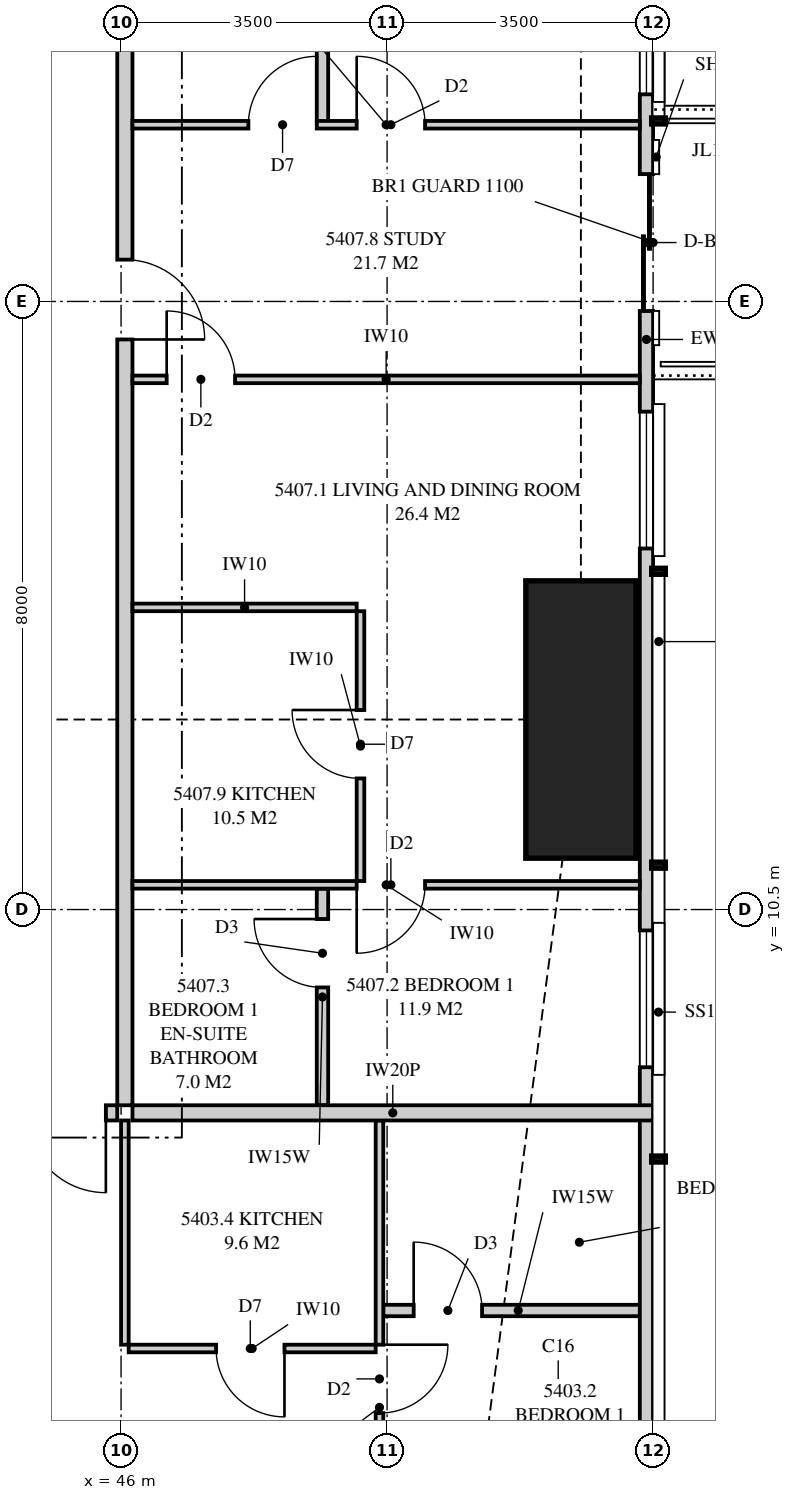
"""IFC4 building model, lengths in metres.
Left out: names, types, materials, properties, quantities, classifications, styles, units other than length and angle.
Written with IfcOpenShell. Run it as: python <this file> out.ifc"""

import sys

from ifc_helpers import new_model, si_unit, direction, frame, frame_2d, origin, origin_2d, place, context, subcontext, project, spatial, polyline, rectangle, outline, extrude, element, fill, save


model = new_model("IFC4")
c1 = context("Model", 3, precision=1e-05, world=origin(), true_north=direction((0.0, 1.0)))
c2 = subcontext(c1, "Body", "Model", "MODEL_VIEW")
j1 = project(units=[si_unit("LENGTHUNIT", "METRE"), si_unit("PLANEANGLEUNIT", "RADIAN")], contexts=[c1])
p1 = place(None, origin())
s1 = spatial("IfcSite", under=j1, at=p1, CompositionType="ELEMENT")
p2 = place(p1, origin())
s2 = spatial("IfcBuilding", under=s1, at=p2, CompositionType="ELEMENT")
p3 = place(p2, frame((0.0, 0.0, 197.9)))
s3 = spatial("IfcBuildingStorey", under=s2, at=p3, CompositionType="ELEMENT", Elevation=197.9)
p4 = place(p3, frame((52.05, 13.0, 0.0), z_axis=(0.0, 0.0, 1.0), x_axis=(1.0, 0.0, 0.0)))
e1 = element("IfcColumn", 1, at=p4, inside=s3, PredefinedType="COLUMN", context=c2, shape_type="SweptSolid", body=[
    extrude(rectangle(XDim=1.45, YDim=3.65, at=origin_2d()), origin(), (0.0, 0.0, 1.0), 3.35),
])
p5 = place(p3, frame((52.913, 3.051, 0.0), z_axis=(0.0, 0.0, 1.0), x_axis=(0.0, 1.0, 0.0)))
e2 = element("IfcWall", 2, at=p5, inside=s3, PredefinedType="SOLIDWALL", context=c2, shape_type="SweptSolid", body=[
    extrude(outline(polyline([(0.0, 0.0), (29.897, 0.0), (29.897, 3.11), (22.167, 3.11), (22.167, 2.15), (22.074, 2.15), (22.074, 3.11), (21.949, 3.11), (21.949, 2.15), (9.949, 2.15), (9.949, 3.11), (9.847, 3.11), (9.847, 2.15), (9.706, 2.15), (9.706, 3.11), (0.0, 3.11), (0.0, 0.0)])), frame((0.0, 0.087, 0.0), z_axis=(0.0, -1.0, 0.0), x_axis=(1.0, 0.0, 0.0)), (0.0, 0.0, 1.0), 0.175),
])
p6 = place(p5, frame((5.374, 0.0, 0.4)))
e3 = element("IfcOpeningElement", 3, at=p6, cuts=e2, PredefinedType="OPENING", context=c2, shape_type="SweptSolid", body=[
    extrude(rectangle(XDim=1.8, YDim=1.7, at=frame_2d((0.9, 0.85))), frame((0.0, 0.097, 0.0), z_axis=(0.0, -1.0, 0.0), x_axis=(1.0, 0.0, 0.0)), (0.0, 0.0, 1.0), 0.195),
])
p7 = place(p5, frame((12.199, 0.0, 0.4)))
e4 = element("IfcOpeningElement", 4, at=p7, cuts=e2, PredefinedType="OPENING", context=c2, shape_type="SweptSolid", body=[
    extrude(rectangle(XDim=1.8, YDim=1.7, at=frame_2d((0.9, 0.85))), frame((0.0, 0.097, 0.0), z_axis=(0.0, -1.0, 0.0), x_axis=(1.0, 0.0, 0.0)), (0.0, 0.0, 1.0), 0.195),
])
p8 = place(p5, frame((15.324, 0.0, 0.0)))
e5 = element("IfcOpeningElement", 5, at=p8, cuts=e2, PredefinedType="OPENING", context=c2, shape_type="SweptSolid", body=[
    extrude(rectangle(XDim=1.8, YDim=2.1, at=frame_2d((0.9, 1.05))), frame((0.0, 0.097, 0.0), z_axis=(0.0, -1.0, 0.0), x_axis=(1.0, 0.0, 0.0)), (0.0, 0.0, 1.0), 0.195),
])
p9 = place(p5, frame((18.174, 0.0, 0.4)))
e6 = element("IfcOpeningElement", 6, at=p9, cuts=e2, PredefinedType="OPENING", context=c2, shape_type="SweptSolid", body=[
    extrude(rectangle(XDim=1.8, YDim=1.7, at=frame_2d((0.9, 0.85))), frame((0.0, 0.097, 0.0), z_axis=(0.0, -1.0, 0.0), x_axis=(1.0, 0.0, 0.0)), (0.0, 0.0, 1.0), 0.195),
])
p10 = place(p5, frame((23.886, 0.0, 0.4)))
e7 = element("IfcOpeningElement", 7, at=p10, cuts=e2, PredefinedType="OPENING", context=c2, shape_type="SweptSolid", body=[
    extrude(rectangle(XDim=1.8, YDim=1.7, at=frame_2d((0.9, 0.85))), frame((0.0, 0.097, 0.0), z_axis=(0.0, -1.0, 0.0), x_axis=(1.0, 0.0, 0.0)), (0.0, 0.0, 1.0), 0.195),
])
p11 = place(p5, frame((26.871, 0.0, 0.4)))
e8 = element("IfcOpeningElement", 8, at=p11, cuts=e2, PredefinedType="OPENING", context=c2, shape_type="SweptSolid", body=[
    extrude(rectangle(XDim=1.8, YDim=1.7, at=frame_2d((0.9, 0.85))), frame((0.0, 0.097, 0.0), z_axis=(0.0, -1.0, 0.0), x_axis=(1.0, 0.0, 0.0)), (0.0, 0.0, 1.0), 0.195),
])
p12 = place(p3, frame((41.4, 7.825, 0.0), z_axis=(0.0, 0.0, 1.0), x_axis=(1.0, 0.0, 0.0)))
e9 = element("IfcWall", 9, at=p12, inside=s3, PredefinedType="PARTITIONING", context=c2, shape_type="SweptSolid", body=[
    extrude(outline(polyline([(0.0, 0.0), (4.55, 0.0), (4.55, 3.11), (1.688, 3.11), (1.688, 2.541), (1.013, 2.541), (1.013, 3.11), (0.0, 3.11), (0.0, 0.0)])), frame((0.0, 0.1, 0.0), z_axis=(0.0, -1.0, 0.0), x_axis=(1.0, 0.0, 0.0)), (0.0, 0.0, 1.0), 0.2),
])
p13 = place(p12, frame((3.35, 0.0, 0.0)))
e10 = element("IfcOpeningElement", 10, at=p13, cuts=e9, PredefinedType="OPENING", context=c2, shape_type="SweptSolid", body=[
    extrude(rectangle(XDim=1.05, YDim=2.2, at=frame_2d((0.525, 1.1))), frame((0.0, 0.11, 0.0), z_axis=(0.0, -1.0, 0.0), x_axis=(1.0, 0.0, 0.0)), (0.0, 0.0, 1.0), 0.22),
])
p14 = place(p3, frame((49.4, 0.175, 0.0), z_axis=(0.0, 0.0, 1.0), x_axis=(0.0, 1.0, 0.0)))
e11 = element("IfcWall", 11, at=p14, inside=s3, PredefinedType="PARTITIONING", context=c2, shape_type="SweptSolid", body=[
    extrude(outline(polyline([(0.0, 0.0), (7.55, 0.0), (7.55, 3.11), (2.825, 3.11), (2.825, 2.15), (1.079, 2.15), (1.079, 3.11), (0.0, 3.11), (0.0, 0.0)])), frame((0.0, 0.05, 0.0), z_axis=(0.0, -1.0, 0.0), x_axis=(1.0, 0.0, 0.0)), (0.0, 0.0, 1.0), 0.1),
])
p15 = place(p14, frame((3.7, 0.0, 0.0)))
e12 = element("IfcOpeningElement", 12, at=p15, cuts=e11, PredefinedType="OPENING", context=c2, shape_type="SweptSolid", body=[
    extrude(rectangle(XDim=0.9, YDim=2.1, at=frame_2d((0.45, 1.05))), frame((0.0, 0.06, 0.0), z_axis=(0.0, -1.0, 0.0), x_axis=(1.0, 0.0, 0.0)), (0.0, 0.0, 1.0), 0.12),
])
p16 = place(p3, frame((49.45, 5.225, 0.0), z_axis=(0.0, 0.0, 1.0), x_axis=(1.0, 0.0, 0.0)))
e13 = element("IfcWall", 13, at=p16, inside=s3, PredefinedType="PLUMBINGWALL", context=c2, shape_type="SweptSolid", body=[
    extrude(outline(polyline([(0.0, 0.0), (3.55, 0.0), (3.55, 3.11), (2.472, 3.11), (2.472, 2.15), (0.687, 2.15), (0.687, 3.11), (0.0, 3.11), (0.0, 0.0)])), frame((0.0, 0.075, 0.0), z_axis=(0.0, -1.0, 0.0), x_axis=(1.0, 0.0, 0.0)), (0.0, 0.0, 1.0), 0.15),
])
p17 = place(p16, frame((0.4, 0.0, 0.0)))
e14 = element("IfcOpeningElement", 14, at=p17, cuts=e13, PredefinedType="OPENING", context=c2, shape_type="SweptSolid", body=[
    extrude(rectangle(XDim=0.9, YDim=2.1, at=frame_2d((0.45, 1.05))), frame((0.0, 0.085, 0.0), z_axis=(0.0, -1.0, 0.0), x_axis=(1.0, 0.0, 0.0)), (0.0, 0.0, 1.0), 0.17),
])
p18 = place(p3, frame((46.1, 4.725, 0.0), z_axis=(0.0, 0.0, 1.0), x_axis=(1.0, 0.0, 0.0)))
e15 = element("IfcWall", 15, at=p18, inside=s3, PredefinedType="PARTITIONING", context=c2, shape_type="SweptSolid", body=[
    extrude(rectangle(XDim=3.25, YDim=0.1, at=frame_2d((1.625, 0.0))), origin(), (0.0, 0.0, 1.0), 3.11),
])
p19 = place(p18, frame((1.15, 0.0, 0.0)))
e16 = element("IfcOpeningElement", 16, at=p19, cuts=e15, PredefinedType="OPENING", context=c2, shape_type="SweptSolid", body=[
    extrude(rectangle(XDim=0.9, YDim=2.1, at=frame_2d((0.45, 1.05))), frame((0.0, 0.06, 0.0), z_axis=(0.0, -1.0, 0.0), x_axis=(1.0, 0.0, 0.0)), (0.0, 0.0, 1.0), 0.12),
])
p20 = place(p3, frame((46.05, 4.775, 0.0), z_axis=(0.0, 0.0, 1.0), x_axis=(0.0, 1.0, 0.0)))
e17 = element("IfcWall", 17, at=p20, inside=s3, PredefinedType="PARTITIONING", context=c2, shape_type="SweptSolid", body=[
    extrude(rectangle(XDim=2.95, YDim=0.1, at=frame_2d((1.475, 0.0))), origin(), (0.0, 0.0, 1.0), 3.11),
])
p21 = place(p3, frame((46.15, 7.825, 0.0), z_axis=(0.0, 0.0, 1.0), x_axis=(1.0, 0.0, 0.0)))
e18 = element("IfcWall", 18, at=p21, inside=s3, PredefinedType="PARTITIONING", context=c2, shape_type="SweptSolid", body=[
    extrude(outline(polyline([(0.0, 0.0), (6.85, 0.0), (6.85, 3.11), (6.138, 3.11), (6.138, 2.15), (4.303, 2.15), (4.303, 3.11), (0.0, 3.11), (0.0, 0.0)])), frame((0.0, 0.1, 0.0), z_axis=(0.0, -1.0, 0.0), x_axis=(1.0, 0.0, 0.0)), (0.0, 0.0, 1.0), 0.2),
])
p22 = place(p3, frame((46.05, 7.925, 0.0), z_axis=(0.0, 0.0, 1.0), x_axis=(0.0, 1.0, 0.0)))
e19 = element("IfcWall", 19, at=p22, inside=s3, PredefinedType="PARTITIONING", context=c2, shape_type="SweptSolid", body=[
    extrude(outline(polyline([(0.0, 0.0), (21.15, 0.0), (21.15, 3.11), (17.412, 3.11), (17.412, 2.541), (16.738, 2.541), (16.738, 3.11), (5.412, 3.11), (5.412, 2.541), (4.738, 2.541), (4.738, 3.11), (0.0, 3.11), (0.0, 0.0)])), frame((0.0, 0.1, 0.0), z_axis=(0.0, -1.0, 0.0), x_axis=(1.0, 0.0, 0.0)), (0.0, 0.0, 1.0), 0.2),
])
p23 = place(p22, frame((10.075, 0.0, 0.0)))
e20 = element("IfcOpeningElement", 20, at=p23, cuts=e19, PredefinedType="OPENING", context=c2, shape_type="SweptSolid", body=[
    extrude(rectangle(XDim=1.05, YDim=2.2, at=frame_2d((0.525, 1.1))), frame((0.0, 0.11, 0.0), z_axis=(0.0, -1.0, 0.0), x_axis=(1.0, 0.0, 0.0)), (0.0, 0.0, 1.0), 0.22),
])
p24 = place(p3, frame((52.825, 10.825, 0.0), z_axis=(0.0, 0.0, 1.0), x_axis=(-1.0, 0.0, 0.0)))
e21 = element("IfcWall", 21, at=p24, inside=s3, PredefinedType="PARTITIONING", context=c2, shape_type="SweptSolid", body=[
    extrude(outline(polyline([(0.0, 0.0), (6.675, 0.0), (6.675, 3.11), (1.928, 3.11), (1.928, 2.15), (0.193, 2.15), (0.193, 3.11), (0.0, 3.11), (0.0, 0.0)])), frame((0.0, 0.05, 0.0), z_axis=(0.0, -1.0, 0.0), x_axis=(1.0, 0.0, 0.0)), (0.0, 0.0, 1.0), 0.1),
])
p25 = place(p24, frame((2.825, 0.0, 0.0)))
e22 = element("IfcOpeningElement", 22, at=p25, cuts=e21, PredefinedType="OPENING", context=c2, shape_type="SweptSolid", body=[
    extrude(rectangle(XDim=0.9, YDim=2.1, at=frame_2d((0.45, 1.05))), frame((0.0, 0.06, 0.0), z_axis=(0.0, -1.0, 0.0), x_axis=(1.0, 0.0, 0.0)), (0.0, 0.0, 1.0), 0.12),
])
p26 = place(p3, frame((52.825, 20.825, 0.0), z_axis=(0.0, 0.0, 1.0), x_axis=(-1.0, 0.0, 0.0)))
e23 = element("IfcWall", 23, at=p26, inside=s3, PredefinedType="PARTITIONING", context=c2, shape_type="SweptSolid", body=[
    extrude(outline(polyline([(0.0, 0.0), (6.675, 0.0), (6.675, 3.11), (1.635, 3.11), (1.635, 2.15), (0.0, 2.15), (0.0, 3.11), (0.0, 0.0)])), frame((0.0, 0.05, 0.0), z_axis=(0.0, -1.0, 0.0), x_axis=(1.0, 0.0, 0.0)), (0.0, 0.0, 1.0), 0.1),
])
p27 = place(p26, frame((2.825, 0.0, 0.0)))
e24 = element("IfcOpeningElement", 24, at=p27, cuts=e23, PredefinedType="OPENING", context=c2, shape_type="SweptSolid", body=[
    extrude(rectangle(XDim=0.9, YDim=2.1, at=frame_2d((0.45, 1.05))), frame((0.0, 0.06, 0.0), z_axis=(0.0, -1.0, 0.0), x_axis=(1.0, 0.0, 0.0)), (0.0, 0.0, 1.0), 0.12),
])
p28 = place(p26, frame((4.25, 0.0, 0.0)))
e25 = element("IfcOpeningElement", 25, at=p28, cuts=e23, PredefinedType="OPENING", context=c2, shape_type="SweptSolid", body=[
    extrude(rectangle(XDim=0.9, YDim=2.1, at=frame_2d((0.45, 1.05))), frame((0.0, 0.06, 0.0), z_axis=(0.0, -1.0, 0.0), x_axis=(1.0, 0.0, 0.0)), (0.0, 0.0, 1.0), 0.12),
])
p29 = place(p3, frame((48.65, 7.925, 0.0), z_axis=(0.0, 0.0, 1.0), x_axis=(0.0, 1.0, 0.0)))
e26 = element("IfcWall", 26, at=p29, inside=s3, PredefinedType="PLUMBINGWALL", context=c2, shape_type="SweptSolid", body=[
    extrude(rectangle(XDim=2.85, YDim=0.15, at=frame_2d((1.425, 0.0))), origin(), (0.0, 0.0, 1.0), 3.11),
])
p30 = place(p29, frame((1.55, 0.0, 0.0)))
e27 = element("IfcOpeningElement", 27, at=p30, cuts=e26, PredefinedType="OPENING", context=c2, shape_type="SweptSolid", body=[
    extrude(rectangle(XDim=0.9, YDim=2.1, at=frame_2d((0.45, 1.05))), frame((0.0, 0.085, 0.0), z_axis=(0.0, -1.0, 0.0), x_axis=(1.0, 0.0, 0.0)), (0.0, 0.0, 1.0), 0.17),
])
p31 = place(p3, frame((48.65, 20.875, 0.0), z_axis=(0.0, 0.0, 1.0), x_axis=(0.0, 1.0, 0.0)))
e28 = element("IfcWall", 28, at=p31, inside=s3, PredefinedType="PLUMBINGWALL", context=c2, shape_type="SweptSolid", body=[
    extrude(outline(polyline([(0.0, 0.0), (4.9, 0.0), (4.9, 3.11), (4.438, 3.11), (4.438, 2.541), (3.812, 2.541), (3.812, 3.11), (0.0, 3.11), (0.0, 0.0)])), frame((0.0, 0.075, 0.0), z_axis=(0.0, -1.0, 0.0), x_axis=(1.0, 0.0, 0.0)), (0.0, 0.0, 1.0), 0.15),
])
p32 = place(p3, frame((52.825, 17.475, 0.0), z_axis=(0.0, 0.0, 1.0), x_axis=(-1.0, 0.0, 0.0)))
e29 = element("IfcWall", 29, at=p32, inside=s3, PredefinedType="PARTITIONING", context=c2, shape_type="SweptSolid", body=[
    extrude(outline(polyline([(0.0, 0.0), (6.675, 0.0), (6.675, 3.11), (1.635, 3.11), (1.635, 2.15), (0.0, 2.15), (0.0, 3.11), (0.0, 0.0)])), frame((0.0, 0.05, 0.0), z_axis=(0.0, -1.0, 0.0), x_axis=(1.0, 0.0, 0.0)), (0.0, 0.0, 1.0), 0.1),
])
p33 = place(p32, frame((5.325, 0.0, 0.0)))
e30 = element("IfcOpeningElement", 30, at=p33, cuts=e29, PredefinedType="OPENING", context=c2, shape_type="SweptSolid", body=[
    extrude(rectangle(XDim=0.9, YDim=2.1, at=frame_2d((0.45, 1.05))), frame((0.0, 0.06, 0.0), z_axis=(0.0, -1.0, 0.0), x_axis=(1.0, 0.0, 0.0)), (0.0, 0.0, 1.0), 0.12),
])
p34 = place(p3, frame((49.15, 10.875, 0.0), z_axis=(0.0, 0.0, 1.0), x_axis=(0.0, 1.0, 0.0)))
e31 = element("IfcWall", 31, at=p34, inside=s3, PredefinedType="PARTITIONING", context=c2, shape_type="SweptSolid", body=[
    extrude(outline(polyline([(0.0, 0.0), (3.55, 0.0), (3.55, 3.11), (2.412, 3.11), (2.412, 2.541), (1.838, 2.541), (1.838, 3.11), (0.0, 3.11), (0.0, 0.0)])), frame((0.0, 0.05, 0.0), z_axis=(0.0, -1.0, 0.0), x_axis=(1.0, 0.0, 0.0)), (0.0, 0.0, 1.0), 0.1),
])
p35 = place(p34, frame((1.35, 0.0, 0.0)))
e32 = element("IfcOpeningElement", 32, at=p35, cuts=e31, PredefinedType="OPENING", context=c2, shape_type="SweptSolid", body=[
    extrude(rectangle(XDim=0.9, YDim=2.1, at=frame_2d((0.45, 1.05))), frame((0.0, 0.06, 0.0), z_axis=(0.0, -1.0, 0.0), x_axis=(1.0, 0.0, 0.0)), (0.0, 0.0, 1.0), 0.12),
])
p36 = place(p3, frame((49.1, 14.475, 0.0), z_axis=(0.0, 0.0, 1.0), x_axis=(-1.0, 0.0, 0.0)))
e33 = element("IfcWall", 33, at=p36, inside=s3, PredefinedType="PARTITIONING", context=c2, shape_type="SweptSolid", body=[
    extrude(rectangle(XDim=2.95, YDim=0.1, at=frame_2d((1.475, 0.0))), origin(), (0.0, 0.0, 1.0), 3.11),
])
p37 = place(p6, origin())
e34 = element("IfcWindow", 34, at=p37, inside=s3, PartitioningType="SINGLE_PANEL", PredefinedType="WINDOW", context=c2, shape_type="SweptSolid", body=[
    extrude(rectangle(XDim=1.8, YDim=1.7, at=frame_2d((0.9, 0.85))), frame((0.0, 0.03, 0.0), z_axis=(0.0, -1.0, 0.0), x_axis=(1.0, 0.0, 0.0)), (0.0, 0.0, 1.0), 0.06),
])
fill(e3, e34)
p38 = place(p7, origin())
e35 = element("IfcWindow", 35, at=p38, inside=s3, PartitioningType="SINGLE_PANEL", PredefinedType="WINDOW", context=c2, shape_type="SweptSolid", body=[
    extrude(rectangle(XDim=1.8, YDim=1.7, at=frame_2d((0.9, 0.85))), frame((0.0, 0.03, 0.0), z_axis=(0.0, -1.0, 0.0), x_axis=(1.0, 0.0, 0.0)), (0.0, 0.0, 1.0), 0.06),
])
fill(e4, e35)
p39 = place(p8, origin())
e36 = element("IfcDoor", 36, at=p39, inside=s3, OperationType="SLIDING_TO_LEFT", PredefinedType="DOOR", context=c2, shape_type="SweptSolid", body=[
    extrude(rectangle(XDim=1.8, YDim=2.1, at=frame_2d((0.9, 1.05))), frame((0.0, 0.025, 0.0), z_axis=(0.0, -1.0, 0.0), x_axis=(1.0, 0.0, 0.0)), (0.0, 0.0, 1.0), 0.05),
])
fill(e5, e36)
p40 = place(p9, origin())
e37 = element("IfcWindow", 37, at=p40, inside=s3, PartitioningType="SINGLE_PANEL", PredefinedType="WINDOW", context=c2, shape_type="SweptSolid", body=[
    extrude(rectangle(XDim=1.8, YDim=1.7, at=frame_2d((0.9, 0.85))), frame((0.0, 0.03, 0.0), z_axis=(0.0, -1.0, 0.0), x_axis=(1.0, 0.0, 0.0)), (0.0, 0.0, 1.0), 0.06),
])
fill(e6, e37)
p41 = place(p13, frame((1.05, 0.0, 0.0), z_axis=(0.0, 0.0, 1.0), x_axis=(-1.0, 0.0, 0.0)))
e38 = element("IfcDoor", 38, at=p41, inside=s3, OperationType="SINGLE_SWING_LEFT", PredefinedType="DOOR", context=c2, shape_type="SweptSolid", body=[
    extrude(rectangle(XDim=1.05, YDim=2.2, at=frame_2d((0.525, 1.1))), frame((0.0, 0.025, 0.0), z_axis=(0.0, -1.0, 0.0), x_axis=(1.0, 0.0, 0.0)), (0.0, 0.0, 1.0), 0.05),
])
fill(e10, e38)
p42 = place(p15, frame((0.9, 0.0, 0.0), z_axis=(0.0, 0.0, 1.0), x_axis=(-1.0, 0.0, 0.0)))
e39 = element("IfcDoor", 39, at=p42, inside=s3, OperationType="SINGLE_SWING_LEFT", PredefinedType="DOOR", context=c2, shape_type="SweptSolid", body=[
    extrude(rectangle(XDim=0.9, YDim=2.1, at=frame_2d((0.45, 1.05))), frame((0.0, 0.025, 0.0), z_axis=(0.0, -1.0, 0.0), x_axis=(1.0, 0.0, 0.0)), (0.0, 0.0, 1.0), 0.05),
])
fill(e12, e39)
p43 = place(p17, origin())
e40 = element("IfcDoor", 40, at=p43, inside=s3, OperationType="SINGLE_SWING_LEFT", PredefinedType="DOOR", context=c2, shape_type="SweptSolid", body=[
    extrude(rectangle(XDim=0.9, YDim=2.1, at=frame_2d((0.45, 1.05))), frame((0.0, 0.025, 0.0), z_axis=(0.0, -1.0, 0.0), x_axis=(1.0, 0.0, 0.0)), (0.0, 0.0, 1.0), 0.05),
])
fill(e14, e40)
p44 = place(p19, frame((0.9, 0.0, 0.0), z_axis=(0.0, 0.0, 1.0), x_axis=(-1.0, 0.0, 0.0)))
e41 = element("IfcDoor", 41, at=p44, inside=s3, OperationType="SINGLE_SWING_LEFT", PredefinedType="DOOR", context=c2, shape_type="SweptSolid", body=[
    extrude(rectangle(XDim=0.9, YDim=2.1, at=frame_2d((0.45, 1.05))), frame((0.0, 0.025, 0.0), z_axis=(0.0, -1.0, 0.0), x_axis=(1.0, 0.0, 0.0)), (0.0, 0.0, 1.0), 0.05),
])
fill(e16, e41)
p45 = place(p23, frame((1.05, 0.0, 0.0), z_axis=(0.0, 0.0, 1.0), x_axis=(-1.0, 0.0, 0.0)))
e42 = element("IfcDoor", 42, at=p45, inside=s3, OperationType="SINGLE_SWING_RIGHT", PredefinedType="DOOR", context=c2, shape_type="SweptSolid", body=[
    extrude(rectangle(XDim=1.05, YDim=2.2, at=frame_2d((0.525, 1.1))), frame((0.0, 0.025, 0.0), z_axis=(0.0, -1.0, 0.0), x_axis=(1.0, 0.0, 0.0)), (0.0, 0.0, 1.0), 0.05),
])
fill(e20, e42)
p46 = place(p25, origin())
e43 = element("IfcDoor", 43, at=p46, inside=s3, OperationType="SINGLE_SWING_RIGHT", PredefinedType="DOOR", context=c2, shape_type="SweptSolid", body=[
    extrude(rectangle(XDim=0.9, YDim=2.1, at=frame_2d((0.45, 1.05))), frame((0.0, 0.025, 0.0), z_axis=(0.0, -1.0, 0.0), x_axis=(1.0, 0.0, 0.0)), (0.0, 0.0, 1.0), 0.05),
])
fill(e22, e43)
p47 = place(p30, origin())
e44 = element("IfcDoor", 44, at=p47, inside=s3, OperationType="SINGLE_SWING_RIGHT", PredefinedType="DOOR", context=c2, shape_type="SweptSolid", body=[
    extrude(rectangle(XDim=0.9, YDim=2.1, at=frame_2d((0.45, 1.05))), frame((0.0, 0.025, 0.0), z_axis=(0.0, -1.0, 0.0), x_axis=(1.0, 0.0, 0.0)), (0.0, 0.0, 1.0), 0.05),
])
fill(e27, e44)
p48 = place(p27, frame((0.9, 0.0, 0.0), z_axis=(0.0, 0.0, 1.0), x_axis=(-1.0, 0.0, 0.0)))
e45 = element("IfcDoor", 45, at=p48, inside=s3, OperationType="SINGLE_SWING_LEFT", PredefinedType="DOOR", context=c2, shape_type="SweptSolid", body=[
    extrude(rectangle(XDim=0.9, YDim=2.1, at=frame_2d((0.45, 1.05))), frame((0.0, 0.025, 0.0), z_axis=(0.0, -1.0, 0.0), x_axis=(1.0, 0.0, 0.0)), (0.0, 0.0, 1.0), 0.05),
])
fill(e24, e45)
p49 = place(p28, frame((0.9, 0.0, 0.0), z_axis=(0.0, 0.0, 1.0), x_axis=(-1.0, 0.0, 0.0)))
e46 = element("IfcDoor", 46, at=p49, inside=s3, OperationType="SINGLE_SWING_RIGHT", PredefinedType="DOOR", context=c2, shape_type="SweptSolid", body=[
    extrude(rectangle(XDim=0.9, YDim=2.1, at=frame_2d((0.45, 1.05))), frame((0.0, 0.025, 0.0), z_axis=(0.0, -1.0, 0.0), x_axis=(1.0, 0.0, 0.0)), (0.0, 0.0, 1.0), 0.05),
])
fill(e25, e46)
p50 = place(p33, frame((0.9, 0.0, 0.0), z_axis=(0.0, 0.0, 1.0), x_axis=(-1.0, 0.0, 0.0)))
e47 = element("IfcDoor", 47, at=p50, inside=s3, OperationType="SINGLE_SWING_LEFT", PredefinedType="DOOR", context=c2, shape_type="SweptSolid", body=[
    extrude(rectangle(XDim=0.9, YDim=2.1, at=frame_2d((0.45, 1.05))), frame((0.0, 0.025, 0.0), z_axis=(0.0, -1.0, 0.0), x_axis=(1.0, 0.0, 0.0)), (0.0, 0.0, 1.0), 0.05),
])
fill(e30, e47)
p51 = place(p35, origin())
e48 = element("IfcDoor", 48, at=p51, inside=s3, OperationType="SINGLE_SWING_RIGHT", PredefinedType="DOOR", context=c2, shape_type="SweptSolid", body=[
    extrude(rectangle(XDim=0.9, YDim=2.1, at=frame_2d((0.45, 1.05))), frame((0.0, 0.025, 0.0), z_axis=(0.0, -1.0, 0.0), x_axis=(1.0, 0.0, 0.0)), (0.0, 0.0, 1.0), 0.05),
])
fill(e32, e48)
save(model, sys.argv[1])
